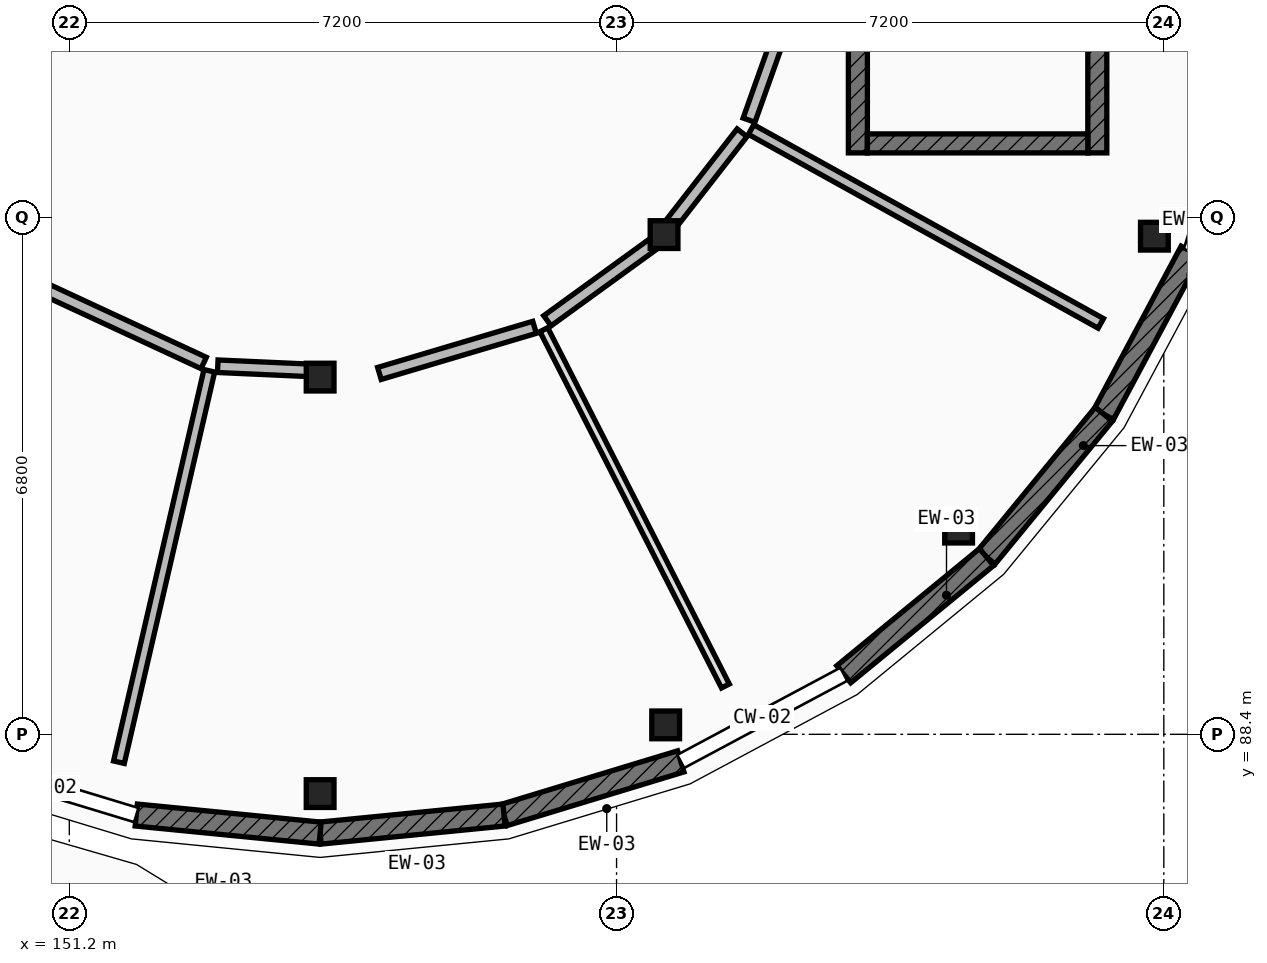
"""IFC4 building model, lengths in metres.
Left out: names, types, materials, properties, quantities, classifications, styles, units other than length and angle.
Written with IfcOpenShell. Run it as: python <this file> out.ifc"""

import sys

from ifc_helpers import new_model, si_unit, direction, frame, frame_2d, origin, origin_2d, place, context, subcontext, project, spatial, rectangle, extrude, element, fill, save


model = new_model("IFC4")
c1 = context("Model", 3, precision=1e-05, world=origin(), true_north=direction((0.0, 1.0)))
c2 = subcontext(c1, "Body", "Model", "MODEL_VIEW")
j1 = project(units=[si_unit("LENGTHUNIT", "METRE"), si_unit("PLANEANGLEUNIT", "RADIAN")], contexts=[c1])
p1 = place(None, origin())
s1 = spatial("IfcSite", under=j1, at=p1, CompositionType="ELEMENT")
p2 = place(p1, origin())
s2 = spatial("IfcBuilding", under=s1, at=p2, CompositionType="ELEMENT")
p3 = place(p2, frame((0.0, 0.0, 8.75)))
s3 = spatial("IfcBuildingStorey", under=s2, at=p3, CompositionType="ELEMENT", Elevation=8.75)
for number, where, z_axis, x_axis in (
    (1, (154.5, 87.62, 0.0), (0.0, 0.0, 1.0), (1.0, 0.0, 0.0)),
    (2, (159.046, 88.524, 0.0), (0.0, 0.0, 1.0), (1.0, 0.0, 0.0)),
    (3, (162.9, 91.1, 0.0), (0.0, 0.0, 1.0), (1.0, 0.0, 0.0)),
    (4, (165.476, 94.954, 0.0), (0.0, 0.0, 1.0), (1.0, 0.0, 0.0)),
    (5, (154.5, 93.1, 0.0), (0.0, 0.0, 1.0), (1.0, 0.0, 0.0)),
    (6, (159.025, 94.975, 0.0), (0.0, 0.0, 1.0), (1.0, 0.0, 0.0)),
):
    element("IfcColumn", number, at=place(p3, frame(where, z_axis=z_axis, x_axis=x_axis)), inside=s3, PredefinedType="COLUMN", context=c2, shape_type="SweptSolid", body=[
        extrude(rectangle(XDim=0.365, YDim=0.365, at=origin_2d()), origin(), (0.0, 0.0, 1.0), 4.2),
    ])
p4 = place(p3, frame((165.956, 94.755, 0.0), z_axis=(0.0, 0.0, 1.0), x_axis=(-0.471432490996, -0.881902152415, 0.0)))
e7 = element("IfcWall", 7, at=p4, inside=s3, PredefinedType="ELEMENTEDWALL", context=c2, shape_type="SweptSolid", body=[
    extrude(rectangle(XDim=2.431, YDim=0.29, at=frame_2d((1.215, 0.0))), origin(), (0.0, 0.0, 1.0), 3.329),
])
p5 = place(p4, frame((0.616, 0.0, 0.85)))
e8 = element("IfcOpeningElement", 8, at=p5, cuts=e7, PredefinedType="OPENING", context=c2, shape_type="SweptSolid", body=[
    extrude(rectangle(XDim=1.2, YDim=2.25, at=frame_2d((0.6, 1.125))), frame((0.0, 0.155, 0.0), z_axis=(0.0, -1.0, 0.0), x_axis=(1.0, 0.0, 0.0)), (0.0, 0.0, 1.0), 0.31),
])
p6 = place(p3, frame((164.81, 92.611, 0.0), z_axis=(0.0, 0.0, 1.0), x_axis=(-0.634347392822, -0.773048113134, 0.0)))
e9 = element("IfcWall", 9, at=p6, inside=s3, PredefinedType="ELEMENTEDWALL", context=c2, shape_type="SweptSolid", body=[
    extrude(rectangle(XDim=2.431, YDim=0.29, at=frame_2d((1.215, 0.0))), origin(), (0.0, 0.0, 1.0), 3.329),
])
p7 = place(p6, frame((0.605, 0.0, 0.85)))
e10 = element("IfcOpeningElement", 10, at=p7, cuts=e9, PredefinedType="OPENING", context=c2, shape_type="SweptSolid", body=[
    extrude(rectangle(XDim=1.22, YDim=1.5, at=frame_2d((0.61, 0.75))), frame((0.0, 0.155, 0.0), z_axis=(0.0, -1.0, 0.0), x_axis=(1.0, 0.0, 0.0)), (0.0, 0.0, 1.0), 0.31),
])
p8 = place(p3, frame((163.268, 90.732, 0.0), z_axis=(0.0, 0.0, 1.0), x_axis=(-0.773048113134, -0.634347392822, 0.0)))
e11 = element("IfcWall", 11, at=p8, inside=s3, PredefinedType="ELEMENTEDWALL", context=c2, shape_type="SweptSolid", body=[
    extrude(rectangle(XDim=2.431, YDim=0.29, at=frame_2d((1.215, 0.0))), origin(), (0.0, 0.0, 1.0), 3.329),
])
p9 = place(p8, frame((0.605, 0.0, 0.85)))
e12 = element("IfcOpeningElement", 12, at=p9, cuts=e11, PredefinedType="OPENING", context=c2, shape_type="SweptSolid", body=[
    extrude(rectangle(XDim=1.22, YDim=1.8, at=frame_2d((0.61, 0.9))), frame((0.0, 0.155, 0.0), z_axis=(0.0, -1.0, 0.0), x_axis=(1.0, 0.0, 0.0)), (0.0, 0.0, 1.0), 0.31),
])
p10 = place(p3, frame((159.245, 88.044, 0.0), z_axis=(0.0, 0.0, 1.0), x_axis=(-0.956892539407, -0.290442193951, 0.0)))
e13 = element("IfcWall", 13, at=p10, inside=s3, PredefinedType="ELEMENTEDWALL", context=c2, shape_type="SweptSolid", body=[
    extrude(rectangle(XDim=2.431, YDim=0.29, at=frame_2d((1.215, 0.0))), origin(), (0.0, 0.0, 1.0), 3.329),
])
p11 = place(p10, frame((0.59, 0.0, 0.85)))
e14 = element("IfcOpeningElement", 14, at=p11, cuts=e13, PredefinedType="OPENING", context=c2, shape_type="SweptSolid", body=[
    extrude(rectangle(XDim=1.25, YDim=1.5, at=frame_2d((0.625, 0.75))), frame((0.0, 0.155, 0.0), z_axis=(0.0, -1.0, 0.0), x_axis=(1.0, 0.0, 0.0)), (0.0, 0.0, 1.0), 0.31),
])
p12 = place(p3, frame((156.919, 87.338, 0.0), z_axis=(0.0, 0.0, 1.0), x_axis=(-0.995202863323, -0.097832820839, 0.0)))
e15 = element("IfcWall", 15, at=p12, inside=s3, PredefinedType="ELEMENTEDWALL", context=c2, shape_type="SweptSolid", body=[
    extrude(rectangle(XDim=2.431, YDim=0.29, at=frame_2d((1.215, 0.0))), origin(), (0.0, 0.0, 1.0), 3.329),
])
p13 = place(p12, frame((0.59, 0.0, 0.85)))
e16 = element("IfcOpeningElement", 16, at=p13, cuts=e15, PredefinedType="OPENING", context=c2, shape_type="SweptSolid", body=[
    extrude(rectangle(XDim=1.25, YDim=1.8, at=frame_2d((0.625, 0.9))), frame((0.0, 0.155, 0.0), z_axis=(0.0, -1.0, 0.0), x_axis=(1.0, 0.0, 0.0)), (0.0, 0.0, 1.0), 0.31),
])
p14 = place(p3, frame((154.5, 87.1, 0.0), z_axis=(0.0, 0.0, 1.0), x_axis=(-0.995202863323, 0.097832820839, 0.0)))
e17 = element("IfcWall", 17, at=p14, inside=s3, PredefinedType="ELEMENTEDWALL", context=c2, shape_type="SweptSolid", body=[
    extrude(rectangle(XDim=2.431, YDim=0.29, at=frame_2d((1.215, 0.0))), origin(), (0.0, 0.0, 1.0), 3.329),
])
p15 = place(p14, frame((0.59, 0.0, 0.85)))
e18 = element("IfcOpeningElement", 18, at=p15, cuts=e17, PredefinedType="OPENING", context=c2, shape_type="SweptSolid", body=[
    extrude(rectangle(XDim=1.25, YDim=2.1, at=frame_2d((0.625, 1.05))), frame((0.0, 0.155, 0.0), z_axis=(0.0, -1.0, 0.0), x_axis=(1.0, 0.0, 0.0)), (0.0, 0.0, 1.0), 0.31),
])
p16 = place(p3, frame((161.575, 102.95, 0.0), z_axis=(0.0, 0.0, 1.0), x_axis=(0.0, -1.0, 0.0)))
e19 = element("IfcWall", 19, at=p16, inside=s3, PredefinedType="SHEAR", context=c2, shape_type="SweptSolid", body=[
    extrude(rectangle(XDim=6.9, YDim=0.25, at=frame_2d((3.45, 0.0))), origin(), (0.0, 0.0, 1.0), 3.975),
])
p17 = place(p16, frame((0.43, 0.0, 0.0)))
e20 = element("IfcOpeningElement", 20, at=p17, cuts=e19, PredefinedType="OPENING", context=c2, shape_type="SweptSolid", body=[
    extrude(rectangle(XDim=1.1, YDim=2.15, at=frame_2d((0.55, 1.075))), frame((0.0, 0.135, 0.0), z_axis=(0.0, -1.0, 0.0), x_axis=(1.0, 0.0, 0.0)), (0.0, 0.0, 1.0), 0.27),
])
p18 = place(p3, frame((164.725, 102.95, 0.0), z_axis=(0.0, 0.0, 1.0), x_axis=(0.0, -1.0, 0.0)))
e21 = element("IfcWall", 21, at=p18, inside=s3, PredefinedType="SHEAR", context=c2, shape_type="SweptSolid", body=[
    extrude(rectangle(XDim=6.9, YDim=0.25, at=frame_2d((3.45, 0.0))), origin(), (0.0, 0.0, 1.0), 3.975),
])
p19 = place(p3, frame((161.7, 96.175, 0.0), z_axis=(0.0, 0.0, 1.0), x_axis=(1.0, 0.0, 0.0)))
e22 = element("IfcWall", 22, at=p19, inside=s3, PredefinedType="SHEAR", context=c2, shape_type="SweptSolid", body=[
    extrude(rectangle(XDim=2.9, YDim=0.25, at=frame_2d((1.45, 0.0))), origin(), (0.0, 0.0, 1.0), 3.975),
])
p20 = place(p3, frame((153.042, 93.183, 0.0), z_axis=(0.0, 0.0, 1.0), x_axis=(-0.224943840984, -0.974371730093, 0.0)))
e23 = element("IfcWall", 23, at=p20, inside=s3, PredefinedType="PARTITIONING", context=c2, shape_type="SweptSolid", body=[
    extrude(rectangle(XDim=5.286, YDim=0.145, at=frame_2d((2.643, 0.0))), origin(), (0.0, 0.0, 1.0), 3.304),
])
p21 = place(p3, frame((157.443, 93.724, 0.0), z_axis=(0.0, 0.0, 1.0), x_axis=(0.454011967175, -0.890995585658, 0.0)))
e24 = element("IfcWall", 24, at=p21, inside=s3, PredefinedType="PARTITIONING", context=c2, shape_type="SweptSolid", body=[
    extrude(rectangle(XDim=5.262, YDim=0.115, at=frame_2d((2.631, 0.0))), origin(), (0.0, 0.0, 1.0), 3.304),
])
p22 = place(p3, frame((160.17, 96.357, 0.0), z_axis=(0.0, 0.0, 1.0), x_axis=(0.874649389138, -0.484756068638, 0.0)))
e25 = element("IfcWall", 25, at=p22, inside=s3, PredefinedType="PARTITIONING", context=c2, shape_type="SweptSolid", body=[
    extrude(rectangle(XDim=5.26, YDim=0.145, at=frame_2d((2.63, 0.0))), origin(), (0.0, 0.0, 1.0), 3.304),
])
p23 = place(p3, frame((150.743, 94.319, 0.0), z_axis=(0.0, 0.0, 1.0), x_axis=(0.906989961647, -0.421152240255, 0.0)))
e26 = element("IfcWall", 26, at=p23, inside=s3, PredefinedType="PARTITIONING", context=c2, shape_type="SweptSolid", body=[
    extrude(rectangle(XDim=2.453, YDim=0.165, at=frame_2d((1.227, 0.0))), origin(), (0.0, 0.0, 1.0), 3.304),
])
p24 = place(p3, frame((153.153, 93.243, 0.0), z_axis=(0.0, 0.0, 1.0), x_axis=(0.998998504247, -0.044743586258, 0.0)))
e27 = element("IfcWall", 27, at=p24, inside=s3, PredefinedType="PARTITIONING", context=c2, shape_type="SweptSolid", body=[
    extrude(rectangle(XDim=1.184, YDim=0.165, at=frame_2d((0.592, 0.0))), origin(), (0.0, 0.0, 1.0), 3.304),
])
p25 = place(p3, frame((155.28, 93.148, 0.0), z_axis=(0.0, 0.0, 1.0), x_axis=(0.958517732376, 0.285032904628, 0.0)))
e28 = element("IfcWall", 28, at=p25, inside=s3, PredefinedType="PARTITIONING", context=c2, shape_type="SweptSolid", body=[
    extrude(rectangle(XDim=2.129, YDim=0.165, at=frame_2d((1.065, 0.0))), origin(), (0.0, 0.0, 1.0), 3.304),
])
p26 = place(p25, frame((0.5, 0.0, 0.0)))
e29 = element("IfcOpeningElement", 29, at=p26, cuts=e28, PredefinedType="OPENING", context=c2, shape_type="SweptSolid", body=[
    extrude(rectangle(XDim=1.13, YDim=2.14, at=frame_2d((0.565, 1.07))), frame((0.0, 0.093, 0.0), z_axis=(0.0, -1.0, 0.0), x_axis=(1.0, 0.0, 0.0)), (0.0, 0.0, 1.0), 0.185),
])
p27 = place(p3, frame((157.49, 93.841, 0.0), z_axis=(0.0, 0.0, 1.0), x_axis=(0.809526218979, 0.587083725533, 0.0)))
e30 = element("IfcWall", 30, at=p27, inside=s3, PredefinedType="PARTITIONING", context=c2, shape_type="SweptSolid", body=[
    extrude(rectangle(XDim=1.722, YDim=0.165, at=frame_2d((0.861, 0.0))), origin(), (0.0, 0.0, 1.0), 3.304),
])
p28 = place(p27, frame((0.421, 0.0, 0.0)))
e31 = element("IfcOpeningElement", 31, at=p28, cuts=e30, PredefinedType="OPENING", context=c2, shape_type="SweptSolid", body=[
    extrude(rectangle(XDim=0.88, YDim=2.1, at=frame_2d((0.44, 1.05))), frame((0.0, 0.093, 0.0), z_axis=(0.0, -1.0, 0.0), x_axis=(1.0, 0.0, 0.0)), (0.0, 0.0, 1.0), 0.185),
])
p29 = place(p3, frame((159.129, 95.131, 0.0), z_axis=(0.0, 0.0, 1.0), x_axis=(0.61450363649, 0.788913988176, 0.0)))
e32 = element("IfcWall", 32, at=p29, inside=s3, PredefinedType="PARTITIONING", context=c2, shape_type="SweptSolid", body=[
    extrude(rectangle(XDim=1.5, YDim=0.165, at=frame_2d((0.75, 0.0))), origin(), (0.0, 0.0, 1.0), 3.304),
])
p30 = place(p3, frame((160.143, 96.481, 0.0), z_axis=(0.0, 0.0, 1.0), x_axis=(0.334820358273, 0.942281978861, 0.0)))
e33 = element("IfcWall", 33, at=p30, inside=s3, PredefinedType="PARTITIONING", context=c2, shape_type="SweptSolid", body=[
    extrude(rectangle(XDim=1.908, YDim=0.165, at=frame_2d((0.954, 0.0))), origin(), (0.0, 0.0, 1.0), 3.304),
])
p31 = place(p30, frame((0.369, 0.0, 0.0)))
e34 = element("IfcOpeningElement", 34, at=p31, cuts=e33, PredefinedType="OPENING", context=c2, shape_type="SweptSolid", body=[
    extrude(rectangle(XDim=1.17, YDim=2.24, at=frame_2d((0.585, 1.12))), frame((0.0, 0.093, 0.0), z_axis=(0.0, -1.0, 0.0), x_axis=(1.0, 0.0, 0.0)), (0.0, 0.0, 1.0), 0.185),
])
p32 = place(p5, origin())
e35 = element("IfcWindow", 35, at=p32, inside=s3, PartitioningType="SINGLE_PANEL", PredefinedType="WINDOW", context=c2, shape_type="SweptSolid", body=[
    extrude(rectangle(XDim=1.2, YDim=2.25, at=frame_2d((0.6, 1.125))), frame((0.0, 0.03, 0.0), z_axis=(0.0, -1.0, 0.0), x_axis=(1.0, 0.0, 0.0)), (0.0, 0.0, 1.0), 0.06),
])
fill(e8, e35)
p33 = place(p7, origin())
e36 = element("IfcWindow", 36, at=p33, inside=s3, PartitioningType="SINGLE_PANEL", PredefinedType="WINDOW", context=c2, shape_type="SweptSolid", body=[
    extrude(rectangle(XDim=1.22, YDim=1.5, at=frame_2d((0.61, 0.75))), frame((0.0, 0.03, 0.0), z_axis=(0.0, -1.0, 0.0), x_axis=(1.0, 0.0, 0.0)), (0.0, 0.0, 1.0), 0.06),
])
fill(e10, e36)
p34 = place(p9, origin())
e37 = element("IfcWindow", 37, at=p34, inside=s3, PartitioningType="SINGLE_PANEL", PredefinedType="WINDOW", context=c2, shape_type="SweptSolid", body=[
    extrude(rectangle(XDim=1.22, YDim=1.8, at=frame_2d((0.61, 0.9))), frame((0.0, 0.03, 0.0), z_axis=(0.0, -1.0, 0.0), x_axis=(1.0, 0.0, 0.0)), (0.0, 0.0, 1.0), 0.06),
])
fill(e12, e37)
p35 = place(p11, origin())
e38 = element("IfcWindow", 38, at=p35, inside=s3, PartitioningType="SINGLE_PANEL", PredefinedType="WINDOW", context=c2, shape_type="SweptSolid", body=[
    extrude(rectangle(XDim=1.25, YDim=1.5, at=frame_2d((0.625, 0.75))), frame((0.0, 0.03, 0.0), z_axis=(0.0, -1.0, 0.0), x_axis=(1.0, 0.0, 0.0)), (0.0, 0.0, 1.0), 0.06),
])
fill(e14, e38)
p36 = place(p13, origin())
e39 = element("IfcWindow", 39, at=p36, inside=s3, PartitioningType="SINGLE_PANEL", PredefinedType="WINDOW", context=c2, shape_type="SweptSolid", body=[
    extrude(rectangle(XDim=1.25, YDim=1.8, at=frame_2d((0.625, 0.9))), frame((0.0, 0.03, 0.0), z_axis=(0.0, -1.0, 0.0), x_axis=(1.0, 0.0, 0.0)), (0.0, 0.0, 1.0), 0.06),
])
fill(e16, e39)
p37 = place(p15, origin())
e40 = element("IfcWindow", 40, at=p37, inside=s3, PartitioningType="SINGLE_PANEL", PredefinedType="WINDOW", context=c2, shape_type="SweptSolid", body=[
    extrude(rectangle(XDim=1.25, YDim=2.1, at=frame_2d((0.625, 1.05))), frame((0.0, 0.03, 0.0), z_axis=(0.0, -1.0, 0.0), x_axis=(1.0, 0.0, 0.0)), (0.0, 0.0, 1.0), 0.06),
])
fill(e18, e40)
p38 = place(p26, origin())
e41 = element("IfcDoor", 41, at=p38, inside=s3, OperationType="SINGLE_SWING_LEFT", PredefinedType="DOOR", context=c2, shape_type="SweptSolid", body=[
    extrude(rectangle(XDim=1.13, YDim=2.14, at=frame_2d((0.565, 1.07))), frame((0.0, 0.025, 0.0), z_axis=(0.0, -1.0, 0.0), x_axis=(1.0, 0.0, 0.0)), (0.0, 0.0, 1.0), 0.05),
])
fill(e29, e41)
p39 = place(p28, origin())
e42 = element("IfcDoor", 42, at=p39, inside=s3, OperationType="SINGLE_SWING_RIGHT", PredefinedType="DOOR", context=c2, shape_type="SweptSolid", body=[
    extrude(rectangle(XDim=0.88, YDim=2.1, at=frame_2d((0.44, 1.05))), frame((0.0, 0.025, 0.0), z_axis=(0.0, -1.0, 0.0), x_axis=(1.0, 0.0, 0.0)), (0.0, 0.0, 1.0), 0.05),
])
fill(e31, e42)
p40 = place(p31, origin())
e43 = element("IfcDoor", 43, at=p40, inside=s3, OperationType="SINGLE_SWING_LEFT", PredefinedType="DOOR", context=c2, shape_type="SweptSolid", body=[
    extrude(rectangle(XDim=1.17, YDim=2.24, at=frame_2d((0.585, 1.12))), frame((0.0, 0.025, 0.0), z_axis=(0.0, -1.0, 0.0), x_axis=(1.0, 0.0, 0.0)), (0.0, 0.0, 1.0), 0.05),
])
fill(e34, e43)
save(model, sys.argv[1])
